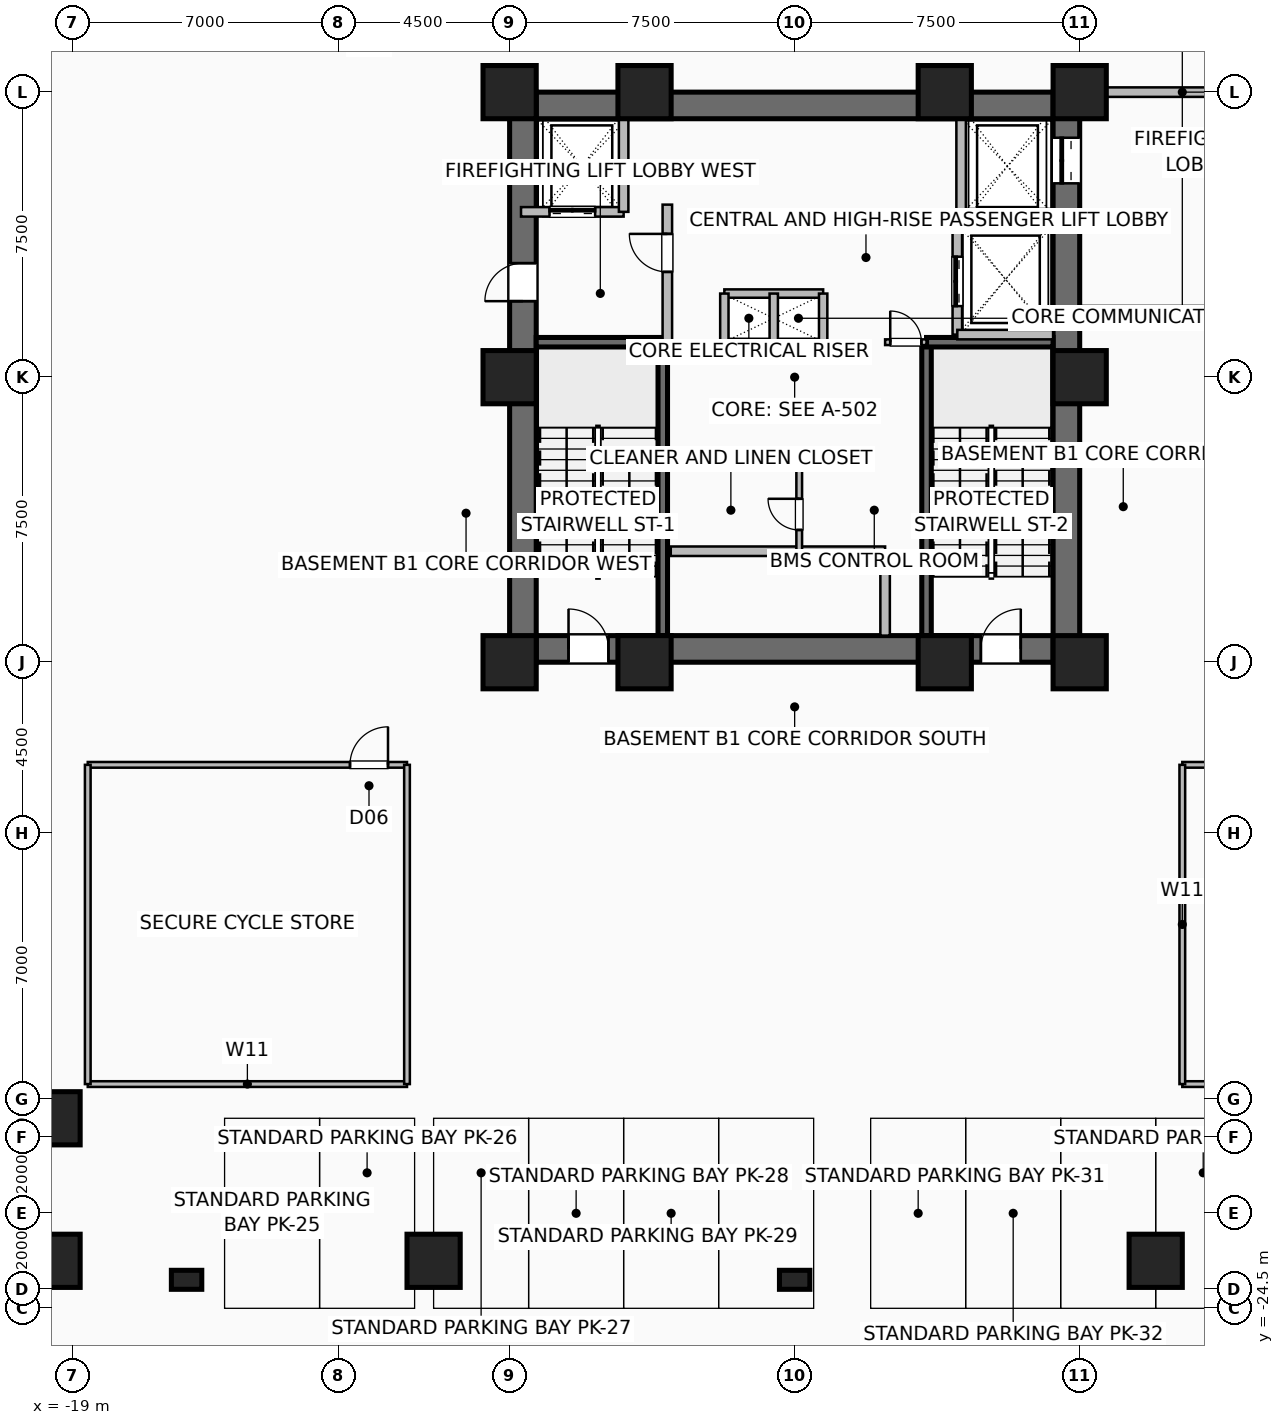
"""IFC4 building model, lengths in metres.
Left out: names, types, materials, properties, quantities, classifications, styles, units other than length and angle.
Written with IfcOpenShell. Run it as: python <this file> out.ifc"""

import sys

from ifc_helpers import new_model, si_unit, direction, frame, frame_2d, origin, origin_2d, place, context, subcontext, project, spatial, rectangle, hollow_rectangle, extrude, element, fill, save


model = new_model("IFC4")
c1 = context("Model", 3, precision=1e-05, world=origin(), true_north=direction((0.0, 1.0)))
c2 = subcontext(c1, "Body", "Model", "MODEL_VIEW")
j1 = project(units=[si_unit("LENGTHUNIT", "METRE"), si_unit("PLANEANGLEUNIT", "RADIAN")], contexts=[c1])
p1 = place(None, origin())
s1 = spatial("IfcSite", under=j1, at=p1, CompositionType="ELEMENT")
p2 = place(p1, origin())
s2 = spatial("IfcBuilding", under=s1, at=p2, CompositionType="ELEMENT")
p3 = place(p2, frame((0.0, 0.0, -5.4)))
s3 = spatial("IfcBuildingStorey", under=s2, at=p3, CompositionType="ELEMENT", Elevation=-5.4)
for number, where, z_axis, x_axis in (
    (1, (-7.5, -7.5, 0.0), (0.0, 0.0, 1.0), (1.0, 0.0, 0.0)),
    (2, (-3.95, -7.5, 0.0), (0.0, 0.0, 1.0), (1.0, 0.0, 0.0)),
    (3, (3.95, -7.5, 0.0), (0.0, 0.0, 1.0), (1.0, 0.0, 0.0)),
    (4, (7.5, -7.5, 0.0), (0.0, 0.0, 1.0), (1.0, 0.0, 0.0)),
    (5, (7.5, 0.0, 0.0), (0.0, 0.0, 1.0), (1.0, 0.0, 0.0)),
    (6, (7.5, 7.5, 0.0), (0.0, 0.0, 1.0), (1.0, 0.0, 0.0)),
    (7, (3.95, 7.5, 0.0), (0.0, 0.0, 1.0), (1.0, 0.0, 0.0)),
    (8, (-3.95, 7.5, 0.0), (0.0, 0.0, 1.0), (1.0, 0.0, 0.0)),
    (9, (-7.5, 7.5, 0.0), (0.0, 0.0, 1.0), (1.0, 0.0, 0.0)),
    (10, (-7.5, 0.0, 0.0), (0.0, 0.0, 1.0), (1.0, 0.0, 0.0)),
):
    element("IfcColumn", number, at=place(p3, frame(where, z_axis=z_axis, x_axis=x_axis)), inside=s3, PredefinedType="COLUMN", context=c2, shape_type="SweptSolid", body=[
        extrude(hollow_rectangle(XDim=1.4, YDim=1.4, WallThickness=0.06, at=origin_2d()), origin(), (0.0, 0.0, 1.0), 5.4),
    ])
for number, where, z_axis, x_axis in (
    (11, (-19.5, -23.25, 0.0), (0.0, 0.0, 1.0), (1.0, 0.0, 0.0)),
    (12, (-9.5, -23.25, 0.0), (0.0, 0.0, 1.0), (1.0, 0.0, 0.0)),
    (13, (9.5, -23.25, 0.0), (0.0, 0.0, 1.0), (1.0, 0.0, 0.0)),
    (14, (-19.5, -19.5, 0.0), (0.0, 0.0, 1.0), (1.0, 0.0, 0.0)),
):
    element("IfcColumn", number, at=place(p3, frame(where, z_axis=z_axis, x_axis=x_axis)), inside=s3, PredefinedType="COLUMN", context=c2, shape_type="SweptSolid", body=[
        extrude(rectangle(XDim=1.4, YDim=1.4, at=origin_2d()), origin(), (0.0, 0.0, 1.0), 5.4),
    ])
for number, where, z_axis, x_axis in (
    (15, (-16.0, -23.75, 0.0), (0.0, 0.0, 1.0), (1.0, 0.0, 0.0)),
    (16, (0.0, -23.75, 0.0), (0.0, 0.0, 1.0), (1.0, 0.0, 0.0)),
):
    element("IfcColumn", number, at=place(p3, frame(where, z_axis=z_axis, x_axis=x_axis)), inside=s3, PredefinedType="PILASTER", context=c2, shape_type="SweptSolid", body=[
        extrude(rectangle(XDim=0.5, YDim=0.8, at=origin_2d()), origin(), (0.0, 0.0, 1.0), 5.4),
    ])
p4 = place(p3, frame((-7.5, -7.15, 0.0), z_axis=(0.0, 0.0, 1.0), x_axis=(1.0, 0.0, 0.0)))
e17 = element("IfcWall", 17, at=p4, inside=s3, PredefinedType="SHEAR", context=c2, shape_type="SweptSolid", body=[
    extrude(rectangle(XDim=15.0, YDim=0.7, at=frame_2d((7.5, 0.0))), origin(), (0.0, 0.0, 1.0), 5.05),
])
p5 = place(p4, frame((1.55, 0.0, 0.0)))
e18 = element("IfcOpeningElement", 18, at=p5, cuts=e17, PredefinedType="OPENING", context=c2, shape_type="SweptSolid", body=[
    extrude(rectangle(XDim=1.05, YDim=2.08, at=frame_2d((0.525, 1.04))), frame((0.0, 0.36, 0.0), z_axis=(0.0, -1.0, 0.0), x_axis=(1.0, 0.0, 0.0)), (0.0, 0.0, 1.0), 0.72),
])
p6 = place(p4, frame((12.4, 0.0, 0.0)))
e19 = element("IfcOpeningElement", 19, at=p6, cuts=e17, PredefinedType="OPENING", context=c2, shape_type="SweptSolid", body=[
    extrude(rectangle(XDim=1.05, YDim=2.08, at=frame_2d((0.525, 1.04))), frame((0.0, 0.36, 0.0), z_axis=(0.0, -1.0, 0.0), x_axis=(1.0, 0.0, 0.0)), (0.0, 0.0, 1.0), 0.72),
])
p7 = place(p3, frame((-7.5, 7.15, 0.0), z_axis=(0.0, 0.0, 1.0), x_axis=(1.0, 0.0, 0.0)))
e20 = element("IfcWall", 20, at=p7, inside=s3, PredefinedType="SHEAR", context=c2, shape_type="SweptSolid", body=[
    extrude(rectangle(XDim=15.0, YDim=0.7, at=frame_2d((7.5, 0.0))), origin(), (0.0, 0.0, 1.0), 5.05),
])
p8 = place(p3, frame((-7.15, -7.5, 0.0), z_axis=(0.0, 0.0, 1.0), x_axis=(0.0, 1.0, 0.0)))
e21 = element("IfcWall", 21, at=p8, inside=s3, PredefinedType="SHEAR", context=c2, shape_type="SweptSolid", body=[
    extrude(rectangle(XDim=15.0, YDim=0.7, at=frame_2d((7.5, 0.0))), origin(), (0.0, 0.0, 1.0), 5.05),
])
p9 = place(p8, frame((9.5, 0.0, 0.0)))
e22 = element("IfcOpeningElement", 22, at=p9, cuts=e21, PredefinedType="OPENING", context=c2, shape_type="SweptSolid", body=[
    extrude(rectangle(XDim=1.0, YDim=2.08, at=frame_2d((0.5, 1.04))), frame((0.0, 0.36, 0.0), z_axis=(0.0, -1.0, 0.0), x_axis=(1.0, 0.0, 0.0)), (0.0, 0.0, 1.0), 0.72),
])
p10 = place(p3, frame((7.15, -7.5, 0.0), z_axis=(0.0, 0.0, 1.0), x_axis=(0.0, 1.0, 0.0)))
e23 = element("IfcWall", 23, at=p10, inside=s3, PredefinedType="SHEAR", context=c2, shape_type="SweptSolid", body=[
    extrude(rectangle(XDim=15.0, YDim=0.7, at=frame_2d((7.5, 0.0))), origin(), (0.0, 0.0, 1.0), 5.05),
])
p11 = place(p10, frame((12.6, 0.0, 0.0)))
e24 = element("IfcOpeningElement", 24, at=p11, cuts=e23, PredefinedType="OPENING", context=c2, shape_type="SweptSolid", body=[
    extrude(rectangle(XDim=1.2, YDim=2.2, at=frame_2d((0.6, 1.1))), frame((0.0, 0.36, 0.0), z_axis=(0.0, -1.0, 0.0), x_axis=(1.0, 0.0, 0.0)), (0.0, 0.0, 1.0), 0.72),
])
p12 = place(p3, frame((-3.47, -6.8, 0.0), z_axis=(0.0, 0.0, 1.0), x_axis=(0.0, 1.0, 0.0)))
e25 = element("IfcWall", 25, at=p12, inside=s3, PredefinedType="SHEAR", context=c2, shape_type="SweptSolid", body=[
    extrude(rectangle(XDim=7.72, YDim=0.25, at=frame_2d((3.86, 0.0))), origin(), (0.0, 0.0, 1.0), 5.05),
])
p13 = place(p3, frame((-6.8, 0.92, 0.0), z_axis=(0.0, 0.0, 1.0), x_axis=(1.0, 0.0, 0.0)))
e26 = element("IfcWall", 26, at=p13, inside=s3, PredefinedType="SHEAR", context=c2, shape_type="SweptSolid", body=[
    extrude(rectangle(XDim=3.33, YDim=0.25, at=frame_2d((1.665, 0.0))), origin(), (0.0, 0.0, 1.0), 5.05),
])
p14 = place(p3, frame((3.47, -6.8, 0.0), z_axis=(0.0, 0.0, 1.0), x_axis=(0.0, 1.0, 0.0)))
e27 = element("IfcWall", 27, at=p14, inside=s3, PredefinedType="SHEAR", context=c2, shape_type="SweptSolid", body=[
    extrude(rectangle(XDim=7.72, YDim=0.25, at=frame_2d((3.86, 0.0))), origin(), (0.0, 0.0, 1.0), 5.05),
])
p15 = place(p3, frame((3.47, 0.92, 0.0), z_axis=(0.0, 0.0, 1.0), x_axis=(1.0, 0.0, 0.0)))
e28 = element("IfcWall", 28, at=p15, inside=s3, PredefinedType="SHEAR", context=c2, shape_type="SweptSolid", body=[
    extrude(rectangle(XDim=3.33, YDim=0.25, at=frame_2d((1.665, 0.0))), origin(), (0.0, 0.0, 1.0), 5.05),
])
for number, where, z_axis, x_axis in (
    (29, (-1.85, 2.2, 0.0), (0.0, 0.0, 1.0), (1.0, 0.0, 0.0)),
    (30, (-1.85, 0.9, 0.0), (0.0, 0.0, 1.0), (1.0, 0.0, 0.0)),
):
    element("IfcWall", number, at=place(p3, frame(where, z_axis=z_axis, x_axis=x_axis)), inside=s3, PredefinedType="PARTITIONING", context=c2, shape_type="SweptSolid", body=[
        extrude(rectangle(XDim=2.6, YDim=0.22, at=frame_2d((1.3, 0.0))), origin(), (0.0, 0.0, 1.0), 5.05),
    ])
for number, where, z_axis, x_axis in (
    (31, (-0.55, 0.9, 0.0), (0.0, 0.0, 1.0), (0.0, 1.0, 0.0)),
    (32, (0.75, 0.9, 0.0), (0.0, 0.0, 1.0), (0.0, 1.0, 0.0)),
    (33, (-1.85, 0.9, 0.0), (0.0, 0.0, 1.0), (0.0, 1.0, 0.0)),
):
    element("IfcWall", number, at=place(p3, frame(where, z_axis=z_axis, x_axis=x_axis)), inside=s3, PredefinedType="PARTITIONING", context=c2, shape_type="SweptSolid", body=[
        extrude(rectangle(XDim=1.3, YDim=0.22, at=frame_2d((0.65, 0.0))), origin(), (0.0, 0.0, 1.0), 5.05),
    ])
p16 = place(p3, frame((-3.26, -4.58, 0.0), z_axis=(0.0, 0.0, 1.0), x_axis=(1.0, 0.0, 0.0)))
e34 = element("IfcWall", 34, at=p16, inside=s3, PredefinedType="SHEAR", context=c2, shape_type="SweptSolid", body=[
    extrude(rectangle(XDim=5.64, YDim=0.25, at=frame_2d((2.82, 0.0))), origin(), (0.0, 0.0, 1.0), 5.05),
])
p17 = place(p3, frame((2.38, -6.8, 0.0), z_axis=(0.0, 0.0, 1.0), x_axis=(0.0, 1.0, 0.0)))
e35 = element("IfcWall", 35, at=p17, inside=s3, PredefinedType="SHEAR", context=c2, shape_type="SweptSolid", body=[
    extrude(rectangle(XDim=2.22, YDim=0.25, at=frame_2d((1.11, 0.0))), origin(), (0.0, 0.0, 1.0), 5.05),
])
p18 = place(p3, frame((-7.2, 4.35, 0.0), z_axis=(0.0, 0.0, 1.0), x_axis=(1.0, 0.0, 0.0)))
e36 = element("IfcWall", 36, at=p18, inside=s3, PredefinedType="SHEAR", context=c2, shape_type="SweptSolid", body=[
    extrude(rectangle(XDim=2.7, YDim=0.25, at=frame_2d((1.35, 0.0))), origin(), (0.0, 0.0, 1.0), 5.05),
])
p19 = place(p18, frame((0.75, 0.0, 0.0)))
e37 = element("IfcOpeningElement", 37, at=p19, cuts=e36, PredefinedType="OPENING", context=c2, shape_type="SweptSolid", body=[
    extrude(rectangle(XDim=1.2, YDim=2.2, at=frame_2d((0.6, 1.1))), frame((0.0, 0.135, 0.0), z_axis=(0.0, -1.0, 0.0), x_axis=(1.0, 0.0, 0.0)), (0.0, 0.0, 1.0), 0.27),
])
p20 = place(p3, frame((-4.5, 4.35, 0.0), z_axis=(0.0, 0.0, 1.0), x_axis=(0.0, 1.0, 0.0)))
e38 = element("IfcWall", 38, at=p20, inside=s3, PredefinedType="SHEAR", context=c2, shape_type="SweptSolid", body=[
    extrude(rectangle(XDim=2.85, YDim=0.25, at=frame_2d((1.425, 0.0))), origin(), (0.0, 0.0, 1.0), 5.05),
])
p21 = place(p3, frame((4.38, 4.3, 0.0), z_axis=(0.0, 0.0, 1.0), x_axis=(1.0, 0.0, 0.0)))
e39 = element("IfcWall", 39, at=p21, inside=s3, PredefinedType="SHEAR", context=c2, shape_type="SweptSolid", body=[
    extrude(rectangle(XDim=2.42, YDim=0.25, at=frame_2d((1.21, 0.0))), origin(), (0.0, 0.0, 1.0), 5.05),
])
p22 = place(p3, frame((4.38, 4.3, 0.0), z_axis=(0.0, 0.0, 1.0), x_axis=(0.0, 1.0, 0.0)))
e40 = element("IfcWall", 40, at=p22, inside=s3, PredefinedType="SHEAR", context=c2, shape_type="SweptSolid", body=[
    extrude(rectangle(XDim=2.5, YDim=0.25, at=frame_2d((1.25, 0.0))), origin(), (0.0, 0.0, 1.0), 5.05),
])
p23 = place(p3, frame((4.28, 1.12, 0.0), z_axis=(0.0, 0.0, 1.0), x_axis=(0.0, 1.0, 0.0)))
e41 = element("IfcWall", 41, at=p23, inside=s3, PredefinedType="SHEAR", context=c2, shape_type="SweptSolid", body=[
    extrude(rectangle(XDim=2.9, YDim=0.25, at=frame_2d((1.45, 0.0))), origin(), (0.0, 0.0, 1.0), 5.05),
])
p24 = place(p23, frame((0.75, 0.0, 0.0)))
e42 = element("IfcOpeningElement", 42, at=p24, cuts=e41, PredefinedType="OPENING", context=c2, shape_type="SweptSolid", body=[
    extrude(rectangle(XDim=1.3, YDim=2.3, at=frame_2d((0.65, 1.15))), frame((0.0, 0.135, 0.0), z_axis=(0.0, -1.0, 0.0), x_axis=(1.0, 0.0, 0.0)), (0.0, 0.0, 1.0), 0.27),
])
for number, where, z_axis, x_axis in (
    (43, (4.28, 1.12, 0.0), (0.0, 0.0, 1.0), (1.0, 0.0, 0.0)),
    (44, (4.28, 4.02, 0.0), (0.0, 0.0, 1.0), (1.0, 0.0, 0.0)),
):
    element("IfcWall", number, at=place(p3, frame(where, z_axis=z_axis, x_axis=x_axis)), inside=s3, PredefinedType="SHEAR", context=c2, shape_type="SweptSolid", body=[
        extrude(rectangle(XDim=2.52, YDim=0.25, at=frame_2d((1.26, 0.0))), origin(), (0.0, 0.0, 1.0), 5.05),
    ])
p25 = place(p3, frame((-3.35, 0.92, 0.0), z_axis=(0.0, 0.0, 1.0), x_axis=(0.0, 1.0, 0.0)))
e45 = element("IfcWall", 45, at=p25, inside=s3, PredefinedType="SHEAR", context=c2, shape_type="SweptSolid", body=[
    extrude(rectangle(XDim=3.62, YDim=0.25, at=frame_2d((1.81, 0.0))), origin(), (0.0, 0.0, 1.0), 5.05),
])
p26 = place(p25, frame((1.85, 0.0, 0.0)))
e46 = element("IfcOpeningElement", 46, at=p26, cuts=e45, PredefinedType="OPENING", context=c2, shape_type="SweptSolid", body=[
    extrude(rectangle(XDim=1.0, YDim=2.08, at=frame_2d((0.5, 1.04))), frame((0.0, 0.135, 0.0), z_axis=(0.0, -1.0, 0.0), x_axis=(1.0, 0.0, 0.0)), (0.0, 0.0, 1.0), 0.27),
])
p27 = place(p3, frame((2.38, 0.92, 0.0), z_axis=(0.0, 0.0, 1.0), x_axis=(1.0, 0.0, 0.0)))
e47 = element("IfcWall", 47, at=p27, inside=s3, PredefinedType="PARTITIONING", context=c2, shape_type="SweptSolid", body=[
    extrude(rectangle(XDim=1.09, YDim=0.15, at=frame_2d((0.545, 0.0))), origin(), (0.0, 0.0, 1.0), 5.05),
])
p28 = place(p27, frame((0.135, 0.0, 0.0)))
e48 = element("IfcOpeningElement", 48, at=p28, cuts=e47, PredefinedType="OPENING", context=c2, shape_type="SweptSolid", body=[
    extrude(rectangle(XDim=0.82, YDim=2.05, at=frame_2d((0.41, 1.025))), frame((0.0, 0.085, 0.0), z_axis=(0.0, -1.0, 0.0), x_axis=(1.0, 0.0, 0.0)), (0.0, 0.0, 1.0), 0.17),
])
p29 = place(p3, frame((0.12, -4.57, 0.0), z_axis=(0.0, 0.0, 1.0), x_axis=(0.0, 1.0, 0.0)))
e49 = element("IfcWall", 49, at=p29, inside=s3, PredefinedType="PARTITIONING", context=c2, shape_type="SweptSolid", body=[
    extrude(rectangle(XDim=2.14, YDim=0.15, at=frame_2d((1.07, 0.0))), origin(), (0.0, 0.0, 1.0), 5.05),
])
p30 = place(p29, frame((0.55, 0.0, 0.0)))
e50 = element("IfcOpeningElement", 50, at=p30, cuts=e49, PredefinedType="OPENING", context=c2, shape_type="SweptSolid", body=[
    extrude(rectangle(XDim=0.82, YDim=2.05, at=frame_2d((0.41, 1.025))), frame((0.0, 0.085, 0.0), z_axis=(0.0, -1.0, 0.0), x_axis=(1.0, 0.0, 0.0)), (0.0, 0.0, 1.0), 0.17),
])
for number, where, z_axis, x_axis in (
    (51, (7.5, 1.75, 0.0), (0.0, 0.0, 1.0), (1.0, 0.0, 0.0)),
    (52, (7.5, 7.5, 0.0), (0.0, 0.0, 1.0), (1.0, 0.0, 0.0)),
):
    element("IfcWall", number, at=place(p3, frame(where, z_axis=z_axis, x_axis=x_axis)), inside=s3, PredefinedType="SHEAR", context=c2, shape_type="SweptSolid", body=[
        extrude(rectangle(XDim=5.4, YDim=0.25, at=frame_2d((2.7, 0.0))), origin(), (0.0, 0.0, 1.0), 5.05),
    ])
p31 = place(p3, frame((-18.6, -18.6, 0.0), z_axis=(0.0, 0.0, 1.0), x_axis=(1.0, 0.0, 0.0)))
e53 = element("IfcWall", 53, at=p31, inside=s3, PredefinedType="PARTITIONING", context=c2, shape_type="SweptSolid", body=[
    extrude(rectangle(XDim=8.4, YDim=0.15, at=frame_2d((4.2, 0.0))), origin(), (0.0, 0.0, 1.0), 5.05),
])
p32 = place(p3, frame((-18.6, -10.2, 0.0), z_axis=(0.0, 0.0, 1.0), x_axis=(1.0, 0.0, 0.0)))
e54 = element("IfcWall", 54, at=p32, inside=s3, PredefinedType="PARTITIONING", context=c2, shape_type="SweptSolid", body=[
    extrude(rectangle(XDim=8.4, YDim=0.15, at=frame_2d((4.2, 0.0))), origin(), (0.0, 0.0, 1.0), 5.05),
])
p33 = place(p32, frame((6.9, 0.0, 0.0)))
e55 = element("IfcOpeningElement", 55, at=p33, cuts=e54, PredefinedType="OPENING", context=c2, shape_type="SweptSolid", body=[
    extrude(rectangle(XDim=1.0, YDim=2.08, at=frame_2d((0.5, 1.04))), frame((0.0, 0.085, 0.0), z_axis=(0.0, -1.0, 0.0), x_axis=(1.0, 0.0, 0.0)), (0.0, 0.0, 1.0), 0.17),
])
for number, where, z_axis, x_axis in (
    (56, (-18.6, -18.6, 0.0), (0.0, 0.0, 1.0), (0.0, 1.0, 0.0)),
    (57, (-10.2, -18.6, 0.0), (0.0, 0.0, 1.0), (0.0, 1.0, 0.0)),
    (58, (10.2, -18.6, 0.0), (0.0, 0.0, 1.0), (1.0, 0.0, 0.0)),
):
    element("IfcWall", number, at=place(p3, frame(where, z_axis=z_axis, x_axis=x_axis)), inside=s3, PredefinedType="PARTITIONING", context=c2, shape_type="SweptSolid", body=[
        extrude(rectangle(XDim=8.4, YDim=0.15, at=frame_2d((4.2, 0.0))), origin(), (0.0, 0.0, 1.0), 5.05),
    ])
p34 = place(p3, frame((10.2, -10.2, 0.0), z_axis=(0.0, 0.0, 1.0), x_axis=(1.0, 0.0, 0.0)))
e59 = element("IfcWall", 59, at=p34, inside=s3, PredefinedType="PARTITIONING", context=c2, shape_type="SweptSolid", body=[
    extrude(rectangle(XDim=8.4, YDim=0.15, at=frame_2d((4.2, 0.0))), origin(), (0.0, 0.0, 1.0), 5.05),
])
p35 = place(p34, frame((6.9, 0.0, 0.0)))
e60 = element("IfcOpeningElement", 60, at=p35, cuts=e59, PredefinedType="OPENING", context=c2, shape_type="SweptSolid", body=[
    extrude(rectangle(XDim=1.0, YDim=2.08, at=frame_2d((0.5, 1.04))), frame((0.0, 0.085, 0.0), z_axis=(0.0, -1.0, 0.0), x_axis=(1.0, 0.0, 0.0)), (0.0, 0.0, 1.0), 0.17),
])
p36 = place(p3, frame((10.2, -18.6, 0.0), z_axis=(0.0, 0.0, 1.0), x_axis=(0.0, 1.0, 0.0)))
e61 = element("IfcWall", 61, at=p36, inside=s3, PredefinedType="PARTITIONING", context=c2, shape_type="SweptSolid", body=[
    extrude(rectangle(XDim=8.4, YDim=0.15, at=frame_2d((4.2, 0.0))), origin(), (0.0, 0.0, 1.0), 5.05),
])
p37 = place(p5, origin())
e62 = element("IfcDoor", 62, at=p37, inside=s3, OperationType="SINGLE_SWING_LEFT", PredefinedType="DOOR", context=c2, shape_type="SweptSolid", body=[
    extrude(rectangle(XDim=1.05, YDim=2.08, at=frame_2d((0.525, 1.04))), frame((0.0, 0.025, 0.0), z_axis=(0.0, -1.0, 0.0), x_axis=(1.0, 0.0, 0.0)), (0.0, 0.0, 1.0), 0.05),
])
fill(e18, e62)
p38 = place(p6, origin())
e63 = element("IfcDoor", 63, at=p38, inside=s3, OperationType="SINGLE_SWING_RIGHT", PredefinedType="DOOR", context=c2, shape_type="SweptSolid", body=[
    extrude(rectangle(XDim=1.05, YDim=2.08, at=frame_2d((0.525, 1.04))), frame((0.0, 0.025, 0.0), z_axis=(0.0, -1.0, 0.0), x_axis=(1.0, 0.0, 0.0)), (0.0, 0.0, 1.0), 0.05),
])
fill(e19, e63)
p39 = place(p9, origin())
e64 = element("IfcDoor", 64, at=p39, inside=s3, OperationType="SINGLE_SWING_LEFT", PredefinedType="DOOR", context=c2, shape_type="SweptSolid", body=[
    extrude(rectangle(XDim=1.0, YDim=2.08, at=frame_2d((0.5, 1.04))), frame((0.0, 0.025, 0.0), z_axis=(0.0, -1.0, 0.0), x_axis=(1.0, 0.0, 0.0)), (0.0, 0.0, 1.0), 0.05),
])
fill(e22, e64)
p40 = place(p11, origin())
e65 = element("IfcDoor", 65, at=p40, inside=s3, OperationType="DOUBLE_DOOR_SLIDING", PredefinedType="DOOR", context=c2, shape_type="SweptSolid", body=[
    extrude(rectangle(XDim=1.2, YDim=2.2, at=frame_2d((0.6, 1.1))), frame((0.0, 0.025, 0.0), z_axis=(0.0, -1.0, 0.0), x_axis=(1.0, 0.0, 0.0)), (0.0, 0.0, 1.0), 0.05),
])
fill(e24, e65)
p41 = place(p19, origin())
e66 = element("IfcDoor", 66, at=p41, inside=s3, OperationType="DOUBLE_DOOR_SLIDING", PredefinedType="DOOR", context=c2, shape_type="SweptSolid", body=[
    extrude(rectangle(XDim=1.2, YDim=2.2, at=frame_2d((0.6, 1.1))), frame((0.0, 0.025, 0.0), z_axis=(0.0, -1.0, 0.0), x_axis=(1.0, 0.0, 0.0)), (0.0, 0.0, 1.0), 0.05),
])
fill(e37, e66)
p42 = place(p24, origin())
e67 = element("IfcDoor", 67, at=p42, inside=s3, OperationType="DOUBLE_DOOR_SLIDING", PredefinedType="DOOR", context=c2, shape_type="SweptSolid", body=[
    extrude(rectangle(XDim=1.3, YDim=2.3, at=frame_2d((0.65, 1.15))), frame((0.0, 0.025, 0.0), z_axis=(0.0, -1.0, 0.0), x_axis=(1.0, 0.0, 0.0)), (0.0, 0.0, 1.0), 0.05),
])
fill(e42, e67)
p43 = place(p26, origin())
e68 = element("IfcDoor", 68, at=p43, inside=s3, OperationType="SINGLE_SWING_RIGHT", PredefinedType="DOOR", context=c2, shape_type="SweptSolid", body=[
    extrude(rectangle(XDim=1.0, YDim=2.08, at=frame_2d((0.5, 1.04))), frame((0.0, 0.025, 0.0), z_axis=(0.0, -1.0, 0.0), x_axis=(1.0, 0.0, 0.0)), (0.0, 0.0, 1.0), 0.05),
])
fill(e46, e68)
p44 = place(p28, origin())
e69 = element("IfcDoor", 69, at=p44, inside=s3, OperationType="SINGLE_SWING_LEFT", PredefinedType="DOOR", context=c2, shape_type="SweptSolid", body=[
    extrude(rectangle(XDim=0.82, YDim=2.05, at=frame_2d((0.41, 1.025))), frame((0.0, 0.025, 0.0), z_axis=(0.0, -1.0, 0.0), x_axis=(1.0, 0.0, 0.0)), (0.0, 0.0, 1.0), 0.05),
])
fill(e48, e69)
p45 = place(p30, origin())
e70 = element("IfcDoor", 70, at=p45, inside=s3, OperationType="SINGLE_SWING_RIGHT", PredefinedType="DOOR", context=c2, shape_type="SweptSolid", body=[
    extrude(rectangle(XDim=0.82, YDim=2.05, at=frame_2d((0.41, 1.025))), frame((0.0, 0.025, 0.0), z_axis=(0.0, -1.0, 0.0), x_axis=(1.0, 0.0, 0.0)), (0.0, 0.0, 1.0), 0.05),
])
fill(e50, e70)
p46 = place(p33, origin())
e71 = element("IfcDoor", 71, at=p46, inside=s3, OperationType="SINGLE_SWING_RIGHT", PredefinedType="DOOR", context=c2, shape_type="SweptSolid", body=[
    extrude(rectangle(XDim=1.0, YDim=2.08, at=frame_2d((0.5, 1.04))), frame((0.0, 0.025, 0.0), z_axis=(0.0, -1.0, 0.0), x_axis=(1.0, 0.0, 0.0)), (0.0, 0.0, 1.0), 0.05),
])
fill(e55, e71)
save(model, sys.argv[1])
